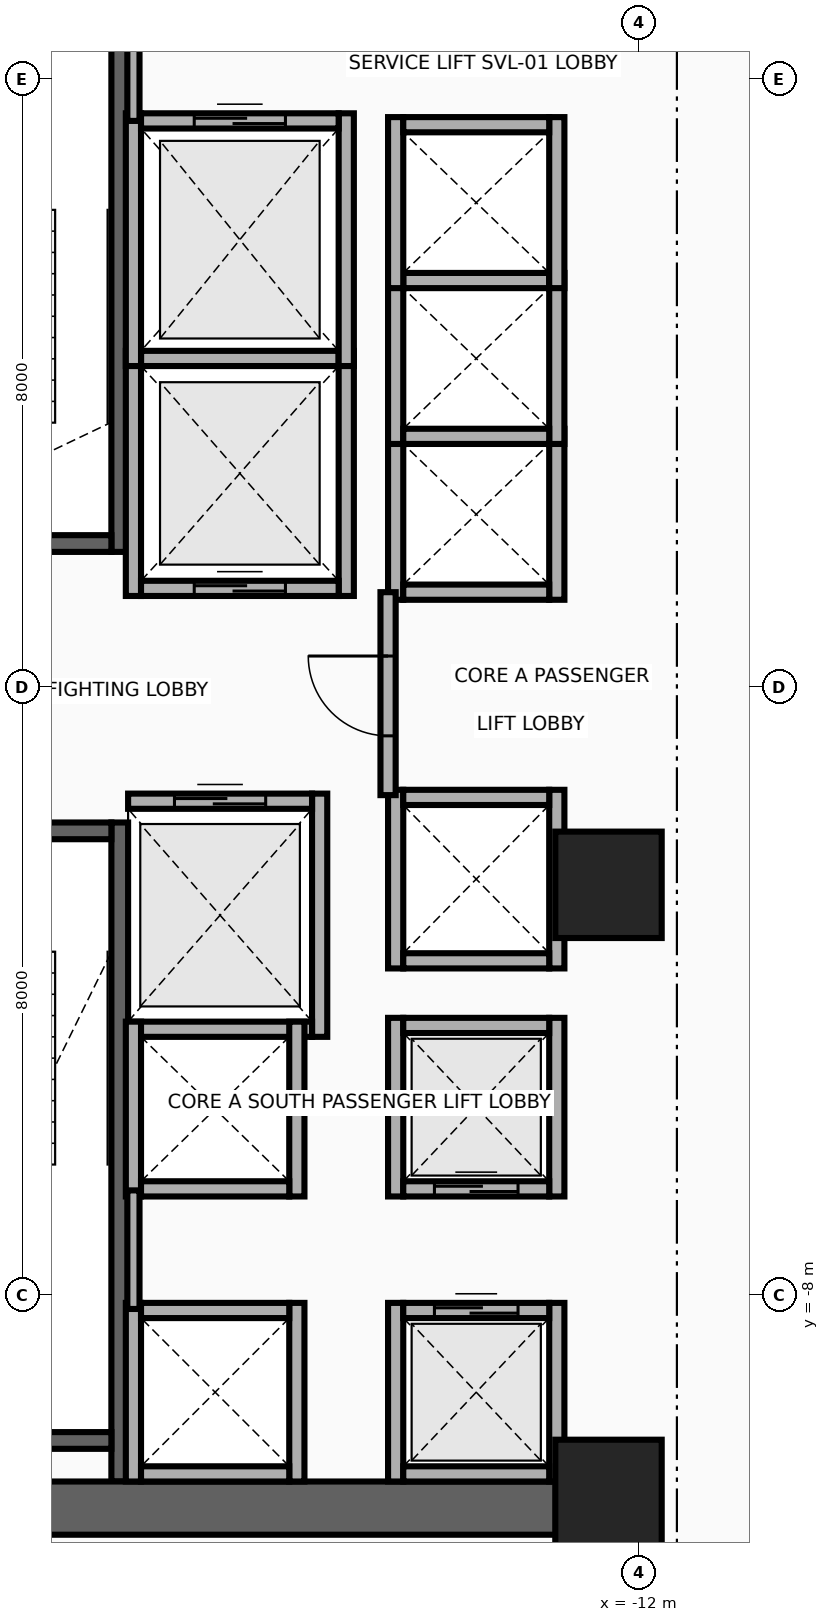
"""IFC4 building model, lengths in metres.
Left out: names, types, materials, properties, quantities, classifications, styles, units other than length and angle.
Written with IfcOpenShell. Run it as: python <this file> out.ifc"""

import sys

from ifc_helpers import new_model, si_unit, direction, frame, frame_2d, origin, origin_2d, place, context, subcontext, project, spatial, rectangle, extrude, source, transform, mapped, element, fill, save


model = new_model("IFC4")
c1 = context("Model", 3, precision=1e-05, world=origin(), true_north=direction((0.0, 1.0)))
c2 = subcontext(c1, "Body", "Model", "MODEL_VIEW")
j1 = project(units=[si_unit("LENGTHUNIT", "METRE"), si_unit("PLANEANGLEUNIT", "RADIAN")], contexts=[c1])
p1 = place(None, origin())
s1 = spatial("IfcSite", under=j1, at=p1, CompositionType="ELEMENT")
p2 = place(p1, origin())
s2 = spatial("IfcBuilding", under=s1, at=p2, CompositionType="ELEMENT")
p3 = place(p2, frame((0.0, 0.0, 33.4)))
s3 = spatial("IfcBuildingStorey", under=s2, at=p3, CompositionType="ELEMENT", Elevation=33.4)
p4 = place(p3, frame((-18.83, 1.78, 0.0), z_axis=(0.0, 0.0, 1.0), x_axis=(0.0, 1.0, 0.0)))
e1 = element("IfcWall", 1, at=p4, inside=s3, PredefinedType="SHEAR", context=c2, shape_type="SweptSolid", body=[
    extrude(rectangle(XDim=8.67, YDim=0.22, at=frame_2d((4.335, 0.0))), origin(), (0.0, 0.0, 1.0), 3.46),
])
p5 = place(p3, frame((-22.05, 1.89, 0.0), z_axis=(0.0, 0.0, 1.0), x_axis=(1.0, 0.0, 0.0)))
e2 = element("IfcWall", 2, at=p5, inside=s3, PredefinedType="SHEAR", context=c2, shape_type="SweptSolid", body=[
    extrude(rectangle(XDim=3.11, YDim=0.22, at=frame_2d((1.555, 0.0))), origin(), (0.0, 0.0, 1.0), 3.46),
])
p6 = place(p5, frame((1.0, 0.0, 0.0)))
e3 = element("IfcOpeningElement", 3, at=p6, cuts=e2, PredefinedType="OPENING", context=c2, shape_type="SweptSolid", body=[
    extrude(rectangle(XDim=1.1, YDim=2.15, at=frame_2d((0.55, 1.075))), frame((0.0, 0.125, 0.0), z_axis=(0.0, -1.0, 0.0), x_axis=(1.0, 0.0, 0.0)), (0.0, 0.0, 1.0), 0.25),
])
p7 = place(p3, frame((-18.83, -10.45, 0.0), z_axis=(0.0, 0.0, 1.0), x_axis=(0.0, 1.0, 0.0)))
e4 = element("IfcWall", 4, at=p7, inside=s3, PredefinedType="SHEAR", context=c2, shape_type="SweptSolid", body=[
    extrude(rectangle(XDim=8.67, YDim=0.22, at=frame_2d((4.335, 0.0))), origin(), (0.0, 0.0, 1.0), 3.46),
])
p8 = place(p3, frame((-22.05, -9.91, 0.0), z_axis=(0.0, 0.0, 1.0), x_axis=(1.0, 0.0, 0.0)))
e5 = element("IfcWall", 5, at=p8, inside=s3, PredefinedType="SHEAR", context=c2, shape_type="SweptSolid", body=[
    extrude(rectangle(XDim=3.11, YDim=0.22, at=frame_2d((1.555, 0.0))), origin(), (0.0, 0.0, 1.0), 3.46),
])
p9 = place(p3, frame((-22.05, -1.89, 0.0), z_axis=(0.0, 0.0, 1.0), x_axis=(1.0, 0.0, 0.0)))
e6 = element("IfcWall", 6, at=p9, inside=s3, PredefinedType="SHEAR", context=c2, shape_type="SweptSolid", body=[
    extrude(rectangle(XDim=3.11, YDim=0.22, at=frame_2d((1.555, 0.0))), origin(), (0.0, 0.0, 1.0), 3.46),
])
p10 = place(p9, frame((1.0, 0.0, 0.0)))
e7 = element("IfcOpeningElement", 7, at=p10, cuts=e6, PredefinedType="OPENING", context=c2, shape_type="SweptSolid", body=[
    extrude(rectangle(XDim=1.1, YDim=2.15, at=frame_2d((0.55, 1.075))), frame((0.0, 0.125, 0.0), z_axis=(0.0, -1.0, 0.0), x_axis=(1.0, 0.0, 0.0)), (0.0, 0.0, 1.0), 0.25),
])
p11 = place(p3, frame((-22.65, -10.8, 0.0), z_axis=(0.0, 0.0, 1.0), x_axis=(1.0, 0.0, 0.0)))
e8 = element("IfcWall", 8, at=p11, inside=s3, PredefinedType="SHEAR", context=c2, shape_type="SweptSolid", body=[
    extrude(rectangle(XDim=10.25, YDim=0.7, at=frame_2d((5.125, 0.0))), origin(), (0.0, 0.0, 1.0), 3.46),
])
m1 = source(origin(), c2, "Body", "SweptSolid", [
    extrude(rectangle(XDim=1.4, YDim=1.4, at=origin_2d()), origin(), (0.0, 0.0, 1.0), 3.7),
])
for number, where, z_axis, x_axis in (
    (9, (-12.4, -10.6, 0.0), (0.0, 0.0, 1.0), (1.0, 0.0, 0.0)),
    (10, (-12.4, -2.6, 0.0), (0.0, 0.0, 1.0), (1.0, 0.0, 0.0)),
):
    element("IfcColumn", number, at=place(p3, frame(where, z_axis=z_axis, x_axis=x_axis)), inside=s3, PredefinedType="COLUMN", context=c2, shape_type="MappedRepresentation", body=[
        mapped(m1, transform((0.0, 0.0, 0.0), x_axis=(1.0, 0.0, 0.0), y_axis=(0.0, 1.0, 0.0), z_axis=(0.0, 0.0, 1.0), scale=1.0)),
    ])
for number, where, z_axis, x_axis in (
    (11, (-18.65, 1.2, 0.0), (0.0, 0.0, 1.0), (0.0, 1.0, 0.0)),
    (12, (-15.85, 1.2, 0.0), (0.0, 0.0, 1.0), (0.0, 1.0, 0.0)),
):
    element("IfcWall", number, at=place(p3, frame(where, z_axis=z_axis, x_axis=x_axis)), inside=s3, PredefinedType="MOVABLE", context=c2, shape_type="SweptSolid", body=[
        extrude(rectangle(XDim=3.225, YDim=0.2, at=frame_2d((1.613, 0.0))), origin(), (0.0, 0.0, 1.0), 3.46),
    ])
p12 = place(p3, frame((-18.55, 1.3, 0.0), z_axis=(0.0, 0.0, 1.0), x_axis=(1.0, 0.0, 0.0)))
e13 = element("IfcWall", 13, at=p12, inside=s3, PredefinedType="MOVABLE", context=c2, shape_type="SweptSolid", body=[
    extrude(rectangle(XDim=2.6, YDim=0.2, at=frame_2d((1.3, 0.0))), origin(), (0.0, 0.0, 1.0), 3.46),
])
p13 = place(p12, frame((0.7, 0.0, 0.0)))
e14 = element("IfcOpeningElement", 14, at=p13, cuts=e13, PredefinedType="OPENING", context=c2, shape_type="SweptSolid", body=[
    extrude(rectangle(XDim=1.2, YDim=2.1, at=frame_2d((0.6, 1.05))), frame((0.0, 0.115, 0.0), z_axis=(0.0, -1.0, 0.0), x_axis=(1.0, 0.0, 0.0)), (0.0, 0.0, 1.0), 0.23),
])
p14 = place(p3, frame((-18.55, 4.325, 0.0), z_axis=(0.0, 0.0, 1.0), x_axis=(1.0, 0.0, 0.0)))
e15 = element("IfcWall", 15, at=p14, inside=s3, PredefinedType="MOVABLE", context=c2, shape_type="SweptSolid", body=[
    extrude(rectangle(XDim=2.6, YDim=0.2, at=frame_2d((1.3, 0.0))), origin(), (0.0, 0.0, 1.0), 3.46),
])
p15 = place(p3, frame((-16.2, -4.6, 0.0), z_axis=(0.0, 0.0, 1.0), x_axis=(0.0, 1.0, 0.0)))
e16 = element("IfcWall", 16, at=p15, inside=s3, PredefinedType="MOVABLE", context=c2, shape_type="SweptSolid", body=[
    extrude(rectangle(XDim=3.2, YDim=0.2, at=frame_2d((1.6, 0.0))), origin(), (0.0, 0.0, 1.0), 3.46),
])
p16 = place(p3, frame((-18.72, -4.5, 0.0), z_axis=(0.0, 0.0, 1.0), x_axis=(1.0, 0.0, 0.0)))
e17 = element("IfcWall", 17, at=p16, inside=s3, PredefinedType="MOVABLE", context=c2, shape_type="SweptSolid", body=[
    extrude(rectangle(XDim=2.42, YDim=0.2, at=frame_2d((1.21, 0.0))), origin(), (0.0, 0.0, 1.0), 3.46),
])
p17 = place(p3, frame((-18.72, -1.5, 0.0), z_axis=(0.0, 0.0, 1.0), x_axis=(1.0, 0.0, 0.0)))
e18 = element("IfcWall", 18, at=p17, inside=s3, PredefinedType="MOVABLE", context=c2, shape_type="SweptSolid", body=[
    extrude(rectangle(XDim=2.42, YDim=0.2, at=frame_2d((1.21, 0.0))), origin(), (0.0, 0.0, 1.0), 3.46),
])
p18 = place(p17, frame((0.61, 0.0, 0.0)))
e19 = element("IfcOpeningElement", 19, at=p18, cuts=e18, PredefinedType="OPENING", context=c2, shape_type="SweptSolid", body=[
    extrude(rectangle(XDim=1.2, YDim=2.1, at=frame_2d((0.6, 1.05))), frame((0.0, 0.115, 0.0), z_axis=(0.0, -1.0, 0.0), x_axis=(1.0, 0.0, 0.0)), (0.0, 0.0, 1.0), 0.23),
])
for number, where, z_axis, x_axis in (
    (20, (-18.65, 4.225, 0.0), (0.0, 0.0, 1.0), (0.0, 1.0, 0.0)),
    (21, (-15.85, 4.225, 0.0), (0.0, 0.0, 1.0), (0.0, 1.0, 0.0)),
):
    element("IfcWall", number, at=place(p3, frame(where, z_axis=z_axis, x_axis=x_axis)), inside=s3, PredefinedType="MOVABLE", context=c2, shape_type="SweptSolid", body=[
        extrude(rectangle(XDim=3.325, YDim=0.2, at=frame_2d((1.663, 0.0))), origin(), (0.0, 0.0, 1.0), 3.46),
    ])
p19 = place(p3, frame((-18.55, 7.45, 0.0), z_axis=(0.0, 0.0, 1.0), x_axis=(1.0, 0.0, 0.0)))
e22 = element("IfcWall", 22, at=p19, inside=s3, PredefinedType="MOVABLE", context=c2, shape_type="SweptSolid", body=[
    extrude(rectangle(XDim=2.6, YDim=0.2, at=frame_2d((1.3, 0.0))), origin(), (0.0, 0.0, 1.0), 3.46),
])
p20 = place(p19, frame((0.7, 0.0, 0.0)))
e23 = element("IfcOpeningElement", 23, at=p20, cuts=e22, PredefinedType="OPENING", context=c2, shape_type="SweptSolid", body=[
    extrude(rectangle(XDim=1.2, YDim=2.1, at=frame_2d((0.6, 1.05))), frame((0.0, 0.115, 0.0), z_axis=(0.0, -1.0, 0.0), x_axis=(1.0, 0.0, 0.0)), (0.0, 0.0, 1.0), 0.23),
])
for number, where, z_axis, x_axis in (
    (24, (-15.2, -10.45, 0.0), (0.0, 0.0, 1.0), (0.0, 1.0, 0.0)),
    (25, (-13.08, -10.45, 0.0), (0.0, 0.0, 1.0), (0.0, 1.0, 0.0)),
):
    element("IfcWall", number, at=place(p3, frame(where, z_axis=z_axis, x_axis=x_axis)), inside=s3, PredefinedType="MOVABLE", context=c2, shape_type="SweptSolid", body=[
        extrude(rectangle(XDim=2.35, YDim=0.2, at=frame_2d((1.175, 0.0))), origin(), (0.0, 0.0, 1.0), 2.583),
    ])
p21 = place(p3, frame((-15.1, -10.35, 0.0), z_axis=(0.0, 0.0, 1.0), x_axis=(1.0, 0.0, 0.0)))
e26 = element("IfcWall", 26, at=p21, inside=s3, PredefinedType="MOVABLE", context=c2, shape_type="SweptSolid", body=[
    extrude(rectangle(XDim=1.92, YDim=0.2, at=frame_2d((0.96, 0.0))), origin(), (0.0, 0.0, 1.0), 2.583),
])
p22 = place(p3, frame((-15.1, -8.2, 0.0), z_axis=(0.0, 0.0, 1.0), x_axis=(1.0, 0.0, 0.0)))
e27 = element("IfcWall", 27, at=p22, inside=s3, PredefinedType="MOVABLE", context=c2, shape_type="SweptSolid", body=[
    extrude(rectangle(XDim=1.92, YDim=0.2, at=frame_2d((0.96, 0.0))), origin(), (0.0, 0.0, 1.0), 3.46),
])
p23 = place(p22, frame((0.41, 0.0, 0.0)))
e28 = element("IfcOpeningElement", 28, at=p23, cuts=e27, PredefinedType="OPENING", context=c2, shape_type="SweptSolid", body=[
    extrude(rectangle(XDim=1.1, YDim=2.1, at=frame_2d((0.55, 1.05))), frame((0.0, 0.115, 0.0), z_axis=(0.0, -1.0, 0.0), x_axis=(1.0, 0.0, 0.0)), (0.0, 0.0, 1.0), 0.23),
])
for number, where, z_axis, x_axis in (
    (29, (-15.2, -6.7, 0.0), (0.0, 0.0, 1.0), (0.0, 1.0, 0.0)),
    (30, (-13.08, -6.7, 0.0), (0.0, 0.0, 1.0), (0.0, 1.0, 0.0)),
):
    element("IfcWall", number, at=place(p3, frame(where, z_axis=z_axis, x_axis=x_axis)), inside=s3, PredefinedType="MOVABLE", context=c2, shape_type="SweptSolid", body=[
        extrude(rectangle(XDim=2.35, YDim=0.2, at=frame_2d((1.175, 0.0))), origin(), (0.0, 0.0, 1.0), 3.46),
    ])
p24 = place(p3, frame((-15.1, -6.6, 0.0), z_axis=(0.0, 0.0, 1.0), x_axis=(1.0, 0.0, 0.0)))
e31 = element("IfcWall", 31, at=p24, inside=s3, PredefinedType="MOVABLE", context=c2, shape_type="SweptSolid", body=[
    extrude(rectangle(XDim=1.92, YDim=0.2, at=frame_2d((0.96, 0.0))), origin(), (0.0, 0.0, 1.0), 3.46),
])
p25 = place(p24, frame((0.41, 0.0, 0.0)))
e32 = element("IfcOpeningElement", 32, at=p25, cuts=e31, PredefinedType="OPENING", context=c2, shape_type="SweptSolid", body=[
    extrude(rectangle(XDim=1.1, YDim=2.1, at=frame_2d((0.55, 1.05))), frame((0.0, 0.115, 0.0), z_axis=(0.0, -1.0, 0.0), x_axis=(1.0, 0.0, 0.0)), (0.0, 0.0, 1.0), 0.23),
])
p26 = place(p3, frame((-15.1, -4.45, 0.0), z_axis=(0.0, 0.0, 1.0), x_axis=(1.0, 0.0, 0.0)))
e33 = element("IfcWall", 33, at=p26, inside=s3, PredefinedType="MOVABLE", context=c2, shape_type="SweptSolid", body=[
    extrude(rectangle(XDim=1.92, YDim=0.2, at=frame_2d((0.96, 0.0))), origin(), (0.0, 0.0, 1.0), 3.46),
])
for number, where, z_axis, x_axis in (
    (34, (-18.65, -10.45, 0.0), (0.0, 0.0, 1.0), (0.0, 1.0, 0.0)),
    (35, (-16.5, -10.45, 0.0), (0.0, 0.0, 1.0), (0.0, 1.0, 0.0)),
):
    element("IfcWall", number, at=place(p3, frame(where, z_axis=z_axis, x_axis=x_axis)), inside=s3, PredefinedType="MOVABLE", context=c2, shape_type="SweptSolid", body=[
        extrude(rectangle(XDim=2.35, YDim=0.2, at=frame_2d((1.175, 0.0))), origin(), (0.0, 0.0, 1.0), 2.583),
    ])
p27 = place(p3, frame((-18.55, -10.35, 0.0), z_axis=(0.0, 0.0, 1.0), x_axis=(1.0, 0.0, 0.0)))
e36 = element("IfcWall", 36, at=p27, inside=s3, PredefinedType="MOVABLE", context=c2, shape_type="SweptSolid", body=[
    extrude(rectangle(XDim=1.95, YDim=0.2, at=frame_2d((0.975, 0.0))), origin(), (0.0, 0.0, 1.0), 2.583),
])
p28 = place(p3, frame((-18.55, -8.2, 0.0), z_axis=(0.0, 0.0, 1.0), x_axis=(1.0, 0.0, 0.0)))
e37 = element("IfcWall", 37, at=p28, inside=s3, PredefinedType="MOVABLE", context=c2, shape_type="SweptSolid", body=[
    extrude(rectangle(XDim=1.95, YDim=0.2, at=frame_2d((0.975, 0.0))), origin(), (0.0, 0.0, 1.0), 3.46),
])
for number, where, z_axis, x_axis in (
    (38, (-15.2, 1.15, 0.0), (0.0, 0.0, 1.0), (0.0, 1.0, 0.0)),
    (39, (-13.08, 1.15, 0.0), (0.0, 0.0, 1.0), (0.0, 1.0, 0.0)),
):
    element("IfcWall", number, at=place(p3, frame(where, z_axis=z_axis, x_axis=x_axis)), inside=s3, PredefinedType="MOVABLE", context=c2, shape_type="SweptSolid", body=[
        extrude(rectangle(XDim=2.25, YDim=0.2, at=frame_2d((1.125, 0.0))), origin(), (0.0, 0.0, 1.0), 3.46),
    ])
p29 = place(p3, frame((-15.1, 1.25, 0.0), z_axis=(0.0, 0.0, 1.0), x_axis=(1.0, 0.0, 0.0)))
e40 = element("IfcWall", 40, at=p29, inside=s3, PredefinedType="MOVABLE", context=c2, shape_type="SweptSolid", body=[
    extrude(rectangle(XDim=1.92, YDim=0.2, at=frame_2d((0.96, 0.0))), origin(), (0.0, 0.0, 1.0), 3.46),
])
for number, where, z_axis, x_axis in (
    (41, (-15.2, 3.2, 0.0), (0.0, 0.0, 1.0), (0.0, 1.0, 0.0)),
    (42, (-13.08, 3.2, 0.0), (0.0, 0.0, 1.0), (0.0, 1.0, 0.0)),
):
    element("IfcWall", number, at=place(p3, frame(where, z_axis=z_axis, x_axis=x_axis)), inside=s3, PredefinedType="MOVABLE", context=c2, shape_type="SweptSolid", body=[
        extrude(rectangle(XDim=2.25, YDim=0.2, at=frame_2d((1.125, 0.0))), origin(), (0.0, 0.0, 1.0), 3.46),
    ])
for number, where, z_axis, x_axis in (
    (43, (-15.1, 3.3, 0.0), (0.0, 0.0, 1.0), (1.0, 0.0, 0.0)),
    (44, (-15.1, 5.35, 0.0), (0.0, 0.0, 1.0), (1.0, 0.0, 0.0)),
):
    element("IfcWall", number, at=place(p3, frame(where, z_axis=z_axis, x_axis=x_axis)), inside=s3, PredefinedType="MOVABLE", context=c2, shape_type="SweptSolid", body=[
        extrude(rectangle(XDim=1.92, YDim=0.2, at=frame_2d((0.96, 0.0))), origin(), (0.0, 0.0, 1.0), 3.46),
    ])
for number, where, z_axis, x_axis in (
    (45, (-15.2, 5.25, 0.0), (0.0, 0.0, 1.0), (0.0, 1.0, 0.0)),
    (46, (-13.08, 5.25, 0.0), (0.0, 0.0, 1.0), (0.0, 1.0, 0.0)),
):
    element("IfcWall", number, at=place(p3, frame(where, z_axis=z_axis, x_axis=x_axis)), inside=s3, PredefinedType="MOVABLE", context=c2, shape_type="SweptSolid", body=[
        extrude(rectangle(XDim=2.25, YDim=0.2, at=frame_2d((1.125, 0.0))), origin(), (0.0, 0.0, 1.0), 3.46),
    ])
p30 = place(p3, frame((-15.1, 7.4, 0.0), z_axis=(0.0, 0.0, 1.0), x_axis=(1.0, 0.0, 0.0)))
e47 = element("IfcWall", 47, at=p30, inside=s3, PredefinedType="MOVABLE", context=c2, shape_type="SweptSolid", body=[
    extrude(rectangle(XDim=1.92, YDim=0.2, at=frame_2d((0.96, 0.0))), origin(), (0.0, 0.0, 1.0), 3.46),
])
for number, where, z_axis, x_axis in (
    (48, (-18.65, -6.7, 0.0), (0.0, 0.0, 1.0), (0.0, 1.0, 0.0)),
    (49, (-16.5, -6.7, 0.0), (0.0, 0.0, 1.0), (0.0, 1.0, 0.0)),
):
    element("IfcWall", number, at=place(p3, frame(where, z_axis=z_axis, x_axis=x_axis)), inside=s3, PredefinedType="MOVABLE", context=c2, shape_type="SweptSolid", body=[
        extrude(rectangle(XDim=2.3, YDim=0.2, at=frame_2d((1.15, 0.0))), origin(), (0.0, 0.0, 1.0), 3.46),
    ])
p31 = place(p3, frame((-18.55, -6.6, 0.0), z_axis=(0.0, 0.0, 1.0), x_axis=(1.0, 0.0, 0.0)))
e50 = element("IfcWall", 50, at=p31, inside=s3, PredefinedType="MOVABLE", context=c2, shape_type="SweptSolid", body=[
    extrude(rectangle(XDim=1.95, YDim=0.2, at=frame_2d((0.975, 0.0))), origin(), (0.0, 0.0, 1.0), 3.46),
])
for number, where, z_axis, x_axis in (
    (51, (-15.2, -3.7, 0.0), (0.0, 0.0, 1.0), (0.0, 1.0, 0.0)),
    (52, (-13.08, -3.7, 0.0), (0.0, 0.0, 1.0), (0.0, 1.0, 0.0)),
):
    element("IfcWall", number, at=place(p3, frame(where, z_axis=z_axis, x_axis=x_axis)), inside=s3, PredefinedType="MOVABLE", context=c2, shape_type="SweptSolid", body=[
        extrude(rectangle(XDim=2.35, YDim=0.2, at=frame_2d((1.175, 0.0))), origin(), (0.0, 0.0, 1.0), 3.46),
    ])
for number, where, z_axis, x_axis in (
    (53, (-15.1, -3.6, 0.0), (0.0, 0.0, 1.0), (1.0, 0.0, 0.0)),
    (54, (-15.1, -1.45, 0.0), (0.0, 0.0, 1.0), (1.0, 0.0, 0.0)),
):
    element("IfcWall", number, at=place(p3, frame(where, z_axis=z_axis, x_axis=x_axis)), inside=s3, PredefinedType="MOVABLE", context=c2, shape_type="SweptSolid", body=[
        extrude(rectangle(XDim=1.92, YDim=0.2, at=frame_2d((0.96, 0.0))), origin(), (0.0, 0.0, 1.0), 3.46),
    ])
p32 = place(p3, frame((-15.3, -1.42, 0.0), z_axis=(0.0, 0.0, 1.0), x_axis=(0.0, 1.0, 0.0)))
e55 = element("IfcWall", 55, at=p32, inside=s3, PredefinedType="PARTITIONING", context=c2, shape_type="SweptSolid", body=[
    extrude(rectangle(XDim=2.67, YDim=0.2, at=frame_2d((1.335, 0.0))), origin(), (0.0, 0.0, 1.0), 3.46),
])
p33 = place(p32, frame((0.78, 0.0, 0.0)))
e56 = element("IfcOpeningElement", 56, at=p33, cuts=e55, PredefinedType="OPENING", context=c2, shape_type="SweptSolid", body=[
    extrude(rectangle(XDim=1.05, YDim=2.15, at=frame_2d((0.525, 1.075))), frame((0.0, 0.115, 0.0), z_axis=(0.0, -1.0, 0.0), x_axis=(1.0, 0.0, 0.0)), (0.0, 0.0, 1.0), 0.23),
])
p34 = place(p3, frame((-18.65, 7.45, 0.0), z_axis=(0.0, 0.0, 1.0), x_axis=(0.0, 1.0, 0.0)))
e57 = element("IfcWall", 57, at=p34, inside=s3, PredefinedType="PARTITIONING", context=c2, shape_type="SweptSolid", body=[
    extrude(rectangle(XDim=2.93, YDim=0.16, at=frame_2d((1.465, 0.0))), origin(), (0.0, 0.0, 1.0), 3.46),
])
p35 = place(p3, frame((-18.65, -8.18, 0.0), z_axis=(0.0, 0.0, 1.0), x_axis=(0.0, 1.0, 0.0)))
e58 = element("IfcWall", 58, at=p35, inside=s3, PredefinedType="PARTITIONING", context=c2, shape_type="SweptSolid", body=[
    extrude(rectangle(XDim=1.56, YDim=0.16, at=frame_2d((0.78, 0.0))), origin(), (0.0, 0.0, 1.0), 3.46),
])
p36 = place(p13, origin())
e59 = element("IfcDoor", 59, at=p36, inside=s3, OperationType="DOUBLE_DOOR_SLIDING", PredefinedType="DOOR", context=c2, shape_type="SweptSolid", body=[
    extrude(rectangle(XDim=1.2, YDim=2.1, at=frame_2d((0.6, 1.05))), frame((0.0, 0.025, 0.0), z_axis=(0.0, -1.0, 0.0), x_axis=(1.0, 0.0, 0.0)), (0.0, 0.0, 1.0), 0.05),
])
fill(e14, e59)
p37 = place(p18, origin())
e60 = element("IfcDoor", 60, at=p37, inside=s3, OperationType="DOUBLE_DOOR_SLIDING", PredefinedType="DOOR", context=c2, shape_type="SweptSolid", body=[
    extrude(rectangle(XDim=1.2, YDim=2.1, at=frame_2d((0.6, 1.05))), frame((0.0, 0.025, 0.0), z_axis=(0.0, -1.0, 0.0), x_axis=(1.0, 0.0, 0.0)), (0.0, 0.0, 1.0), 0.05),
])
fill(e19, e60)
p38 = place(p20, origin())
e61 = element("IfcDoor", 61, at=p38, inside=s3, OperationType="DOUBLE_DOOR_SLIDING", PredefinedType="DOOR", context=c2, shape_type="SweptSolid", body=[
    extrude(rectangle(XDim=1.2, YDim=2.1, at=frame_2d((0.6, 1.05))), frame((0.0, 0.025, 0.0), z_axis=(0.0, -1.0, 0.0), x_axis=(1.0, 0.0, 0.0)), (0.0, 0.0, 1.0), 0.05),
])
fill(e23, e61)
p39 = place(p23, origin())
e62 = element("IfcDoor", 62, at=p39, inside=s3, OperationType="DOUBLE_DOOR_SLIDING", PredefinedType="DOOR", context=c2, shape_type="SweptSolid", body=[
    extrude(rectangle(XDim=1.1, YDim=2.1, at=frame_2d((0.55, 1.05))), frame((0.0, 0.025, 0.0), z_axis=(0.0, -1.0, 0.0), x_axis=(1.0, 0.0, 0.0)), (0.0, 0.0, 1.0), 0.05),
])
fill(e28, e62)
p40 = place(p25, origin())
e63 = element("IfcDoor", 63, at=p40, inside=s3, OperationType="DOUBLE_DOOR_SLIDING", PredefinedType="DOOR", context=c2, shape_type="SweptSolid", body=[
    extrude(rectangle(XDim=1.1, YDim=2.1, at=frame_2d((0.55, 1.05))), frame((0.0, 0.025, 0.0), z_axis=(0.0, -1.0, 0.0), x_axis=(1.0, 0.0, 0.0)), (0.0, 0.0, 1.0), 0.05),
])
fill(e32, e63)
p41 = place(p33, origin())
e64 = element("IfcDoor", 64, at=p41, inside=s3, OperationType="SINGLE_SWING_RIGHT", PredefinedType="DOOR", context=c2, shape_type="SweptSolid", body=[
    extrude(rectangle(XDim=1.05, YDim=2.15, at=frame_2d((0.525, 1.075))), frame((0.0, 0.025, 0.0), z_axis=(0.0, -1.0, 0.0), x_axis=(1.0, 0.0, 0.0)), (0.0, 0.0, 1.0), 0.05),
])
fill(e56, e64)
save(model, sys.argv[1])
